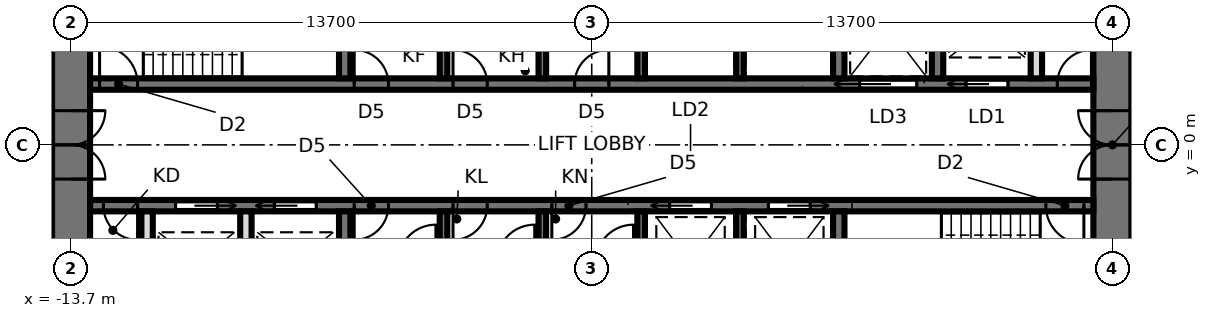
"""IFC4 building model, lengths in metres.
Left out: names, types, materials, properties, quantities, classifications, styles, units other than length and angle.
Written with IfcOpenShell. Run it as: python <this file> out.ifc"""

import sys

from ifc_helpers import new_model, si_unit, direction, frame, frame_2d, origin, place, context, subcontext, project, spatial, rectangle, extrude, element, fill, save


model = new_model("IFC4")
c1 = context("Model", 3, precision=1e-05, world=origin(), true_north=direction((0.0, 1.0)))
c2 = subcontext(c1, "Body", "Model", "MODEL_VIEW")
j1 = project(units=[si_unit("LENGTHUNIT", "METRE"), si_unit("PLANEANGLEUNIT", "RADIAN")], contexts=[c1])
p1 = place(None, origin())
s1 = spatial("IfcSite", under=j1, at=p1, CompositionType="ELEMENT")
p2 = place(p1, origin())
s2 = spatial("IfcBuilding", under=s1, at=p2, CompositionType="ELEMENT")
p3 = place(p2, frame((0.0, 0.0, 211.1)))
s3 = spatial("IfcBuildingStorey", under=s2, at=p3, CompositionType="ELEMENT", Elevation=211.1)
p4 = place(p3, frame((13.7, -9.5, 0.0), z_axis=(0.0, 0.0, 1.0), x_axis=(0.0, 1.0, 0.0)))
e1 = element("IfcWall", 1, at=p4, inside=s3, PredefinedType="SHEAR", context=c2, shape_type="SweptSolid", body=[
    extrude(rectangle(XDim=19.0, YDim=1.0, at=frame_2d((9.5, 0.0))), origin(), (0.0, 0.0, 1.0), 3.9),
])
p5 = place(p4, frame((8.6, 0.0, 0.0)))
e2 = element("IfcOpeningElement", 2, at=p5, cuts=e1, PredefinedType="OPENING", context=c2, shape_type="SweptSolid", body=[
    extrude(rectangle(XDim=1.8, YDim=2.4, at=frame_2d((0.9, 1.2))), frame((0.0, 0.51, 0.0), z_axis=(0.0, -1.0, 0.0), x_axis=(1.0, 0.0, 0.0)), (0.0, 0.0, 1.0), 1.02),
])
p6 = place(p3, frame((-13.7, 9.5, 0.0), z_axis=(0.0, 0.0, 1.0), x_axis=(0.0, -1.0, 0.0)))
e3 = element("IfcWall", 3, at=p6, inside=s3, PredefinedType="SHEAR", context=c2, shape_type="SweptSolid", body=[
    extrude(rectangle(XDim=19.0, YDim=1.0, at=frame_2d((9.5, 0.0))), origin(), (0.0, 0.0, 1.0), 3.9),
])
p7 = place(p6, frame((8.6, 0.0, 0.0)))
e4 = element("IfcOpeningElement", 4, at=p7, cuts=e3, PredefinedType="OPENING", context=c2, shape_type="SweptSolid", body=[
    extrude(rectangle(XDim=1.8, YDim=2.4, at=frame_2d((0.9, 1.2))), frame((0.0, 0.51, 0.0), z_axis=(0.0, -1.0, 0.0), x_axis=(1.0, 0.0, 0.0)), (0.0, 0.0, 1.0), 1.02),
])
p8 = place(p3, frame((-13.2, 1.6, 0.0), z_axis=(0.0, 0.0, 1.0), x_axis=(1.0, 0.0, 0.0)))
e5 = element("IfcWall", 5, at=p8, inside=s3, PredefinedType="SHEAR", context=c2, shape_type="SweptSolid", body=[
    extrude(rectangle(XDim=26.4, YDim=0.3, at=frame_2d((13.2, 0.0))), origin(), (0.0, 0.0, 1.0), 3.9),
])
p9 = place(p8, frame((0.25, 0.0, 0.0)))
e6 = element("IfcOpeningElement", 6, at=p9, cuts=e5, PredefinedType="OPENING", context=c2, shape_type="SweptSolid", body=[
    extrude(rectangle(XDim=1.0, YDim=2.1, at=frame_2d((0.5, 1.05))), frame((0.0, 0.16, 0.0), z_axis=(0.0, -1.0, 0.0), x_axis=(1.0, 0.0, 0.0)), (0.0, 0.0, 1.0), 0.32),
])
p10 = place(p8, frame((23.05, 0.0, 0.0)))
e7 = element("IfcOpeningElement", 7, at=p10, cuts=e5, PredefinedType="OPENING", context=c2, shape_type="SweptSolid", body=[
    extrude(rectangle(XDim=1.1, YDim=2.3, at=frame_2d((0.55, 1.15))), frame((0.0, 0.16, 0.0), z_axis=(0.0, -1.0, 0.0), x_axis=(1.0, 0.0, 0.0)), (0.0, 0.0, 1.0), 0.32),
])
p11 = place(p8, frame((20.25, 0.0, 0.0)))
e8 = element("IfcOpeningElement", 8, at=p11, cuts=e5, PredefinedType="OPENING", context=c2, shape_type="SweptSolid", body=[
    extrude(rectangle(XDim=1.5, YDim=2.4, at=frame_2d((0.75, 1.2))), frame((0.0, 0.16, 0.0), z_axis=(0.0, -1.0, 0.0), x_axis=(1.0, 0.0, 0.0)), (0.0, 0.0, 1.0), 0.32),
])
p12 = place(p8, frame((6.95, 0.0, 0.0)))
e9 = element("IfcOpeningElement", 9, at=p12, cuts=e5, PredefinedType="OPENING", context=c2, shape_type="SweptSolid", body=[
    extrude(rectangle(XDim=0.9, YDim=2.1, at=frame_2d((0.45, 1.05))), frame((0.0, 0.16, 0.0), z_axis=(0.0, -1.0, 0.0), x_axis=(1.0, 0.0, 0.0)), (0.0, 0.0, 1.0), 0.32),
])
p13 = place(p8, frame((9.55, 0.0, 0.0)))
e10 = element("IfcOpeningElement", 10, at=p13, cuts=e5, PredefinedType="OPENING", context=c2, shape_type="SweptSolid", body=[
    extrude(rectangle(XDim=0.9, YDim=2.1, at=frame_2d((0.45, 1.05))), frame((0.0, 0.16, 0.0), z_axis=(0.0, -1.0, 0.0), x_axis=(1.0, 0.0, 0.0)), (0.0, 0.0, 1.0), 0.32),
])
p14 = place(p8, frame((12.75, 0.0, 0.0)))
e11 = element("IfcOpeningElement", 11, at=p14, cuts=e5, PredefinedType="OPENING", context=c2, shape_type="SweptSolid", body=[
    extrude(rectangle(XDim=0.9, YDim=2.1, at=frame_2d((0.45, 1.05))), frame((0.0, 0.16, 0.0), z_axis=(0.0, -1.0, 0.0), x_axis=(1.0, 0.0, 0.0)), (0.0, 0.0, 1.0), 0.32),
])
p15 = place(p8, frame((25.45, 0.0, 0.0)))
e12 = element("IfcOpeningElement", 12, at=p15, cuts=e5, PredefinedType="OPENING", context=c2, shape_type="SweptSolid", body=[
    extrude(rectangle(XDim=0.9, YDim=2.1, at=frame_2d((0.45, 1.05))), frame((0.0, 0.16, 0.0), z_axis=(0.0, -1.0, 0.0), x_axis=(1.0, 0.0, 0.0)), (0.0, 0.0, 1.0), 0.32),
])
p16 = place(p3, frame((-13.2, -1.6, 0.0), z_axis=(0.0, 0.0, 1.0), x_axis=(1.0, 0.0, 0.0)))
e13 = element("IfcWall", 13, at=p16, inside=s3, PredefinedType="SHEAR", context=c2, shape_type="SweptSolid", body=[
    extrude(rectangle(XDim=26.4, YDim=0.3, at=frame_2d((13.2, 0.0))), origin(), (0.0, 0.0, 1.0), 3.9),
])
p17 = place(p16, frame((25.15, 0.0, 0.0)))
e14 = element("IfcOpeningElement", 14, at=p17, cuts=e13, PredefinedType="OPENING", context=c2, shape_type="SweptSolid", body=[
    extrude(rectangle(XDim=1.0, YDim=2.1, at=frame_2d((0.5, 1.05))), frame((0.0, 0.16, 0.0), z_axis=(0.0, -1.0, 0.0), x_axis=(1.0, 0.0, 0.0)), (0.0, 0.0, 1.0), 0.32),
])
p18 = place(p16, frame((6.95, 0.0, 0.0)))
e15 = element("IfcOpeningElement", 15, at=p18, cuts=e13, PredefinedType="OPENING", context=c2, shape_type="SweptSolid", body=[
    extrude(rectangle(XDim=0.9, YDim=2.1, at=frame_2d((0.45, 1.05))), frame((0.0, 0.16, 0.0), z_axis=(0.0, -1.0, 0.0), x_axis=(1.0, 0.0, 0.0)), (0.0, 0.0, 1.0), 0.32),
])
p19 = place(p16, frame((9.55, 0.0, 0.0)))
e16 = element("IfcOpeningElement", 16, at=p19, cuts=e13, PredefinedType="OPENING", context=c2, shape_type="SweptSolid", body=[
    extrude(rectangle(XDim=0.9, YDim=2.1, at=frame_2d((0.45, 1.05))), frame((0.0, 0.16, 0.0), z_axis=(0.0, -1.0, 0.0), x_axis=(1.0, 0.0, 0.0)), (0.0, 0.0, 1.0), 0.32),
])
p20 = place(p16, frame((12.15, 0.0, 0.0)))
e17 = element("IfcOpeningElement", 17, at=p20, cuts=e13, PredefinedType="OPENING", context=c2, shape_type="SweptSolid", body=[
    extrude(rectangle(XDim=0.9, YDim=2.1, at=frame_2d((0.45, 1.05))), frame((0.0, 0.16, 0.0), z_axis=(0.0, -1.0, 0.0), x_axis=(1.0, 0.0, 0.0)), (0.0, 0.0, 1.0), 0.32),
])
p21 = place(p16, frame((15.25, 0.0, 0.0)))
e18 = element("IfcOpeningElement", 18, at=p21, cuts=e13, PredefinedType="OPENING", context=c2, shape_type="SweptSolid", body=[
    extrude(rectangle(XDim=1.1, YDim=2.3, at=frame_2d((0.55, 1.15))), frame((0.0, 0.16, 0.0), z_axis=(0.0, -1.0, 0.0), x_axis=(1.0, 0.0, 0.0)), (0.0, 0.0, 1.0), 0.32),
])
p22 = place(p16, frame((17.85, 0.0, 0.0)))
e19 = element("IfcOpeningElement", 19, at=p22, cuts=e13, PredefinedType="OPENING", context=c2, shape_type="SweptSolid", body=[
    extrude(rectangle(XDim=1.1, YDim=2.3, at=frame_2d((0.55, 1.15))), frame((0.0, 0.16, 0.0), z_axis=(0.0, -1.0, 0.0), x_axis=(1.0, 0.0, 0.0)), (0.0, 0.0, 1.0), 0.32),
])
p23 = place(p16, frame((4.85, 0.0, 0.0)))
e20 = element("IfcOpeningElement", 20, at=p23, cuts=e13, PredefinedType="OPENING", context=c2, shape_type="SweptSolid", body=[
    extrude(rectangle(XDim=1.1, YDim=2.3, at=frame_2d((0.55, 1.15))), frame((0.0, 0.16, 0.0), z_axis=(0.0, -1.0, 0.0), x_axis=(1.0, 0.0, 0.0)), (0.0, 0.0, 1.0), 0.32),
])
p24 = place(p16, frame((2.25, 0.0, 0.0)))
e21 = element("IfcOpeningElement", 21, at=p24, cuts=e13, PredefinedType="OPENING", context=c2, shape_type="SweptSolid", body=[
    extrude(rectangle(XDim=1.1, YDim=2.3, at=frame_2d((0.55, 1.15))), frame((0.0, 0.16, 0.0), z_axis=(0.0, -1.0, 0.0), x_axis=(1.0, 0.0, 0.0)), (0.0, 0.0, 1.0), 0.32),
])
p25 = place(p16, frame((0.35, 0.0, 0.0)))
e22 = element("IfcOpeningElement", 22, at=p25, cuts=e13, PredefinedType="OPENING", context=c2, shape_type="SweptSolid", body=[
    extrude(rectangle(XDim=0.9, YDim=2.1, at=frame_2d((0.45, 1.05))), frame((0.0, 0.16, 0.0), z_axis=(0.0, -1.0, 0.0), x_axis=(1.0, 0.0, 0.0)), (0.0, 0.0, 1.0), 0.32),
])
for number, where, z_axis, x_axis in (
    (23, (-6.5, 1.75, 0.0), (0.0, 0.0, 1.0), (0.0, 1.0, 0.0)),
    (24, (6.5, 1.75, 0.0), (0.0, 0.0, 1.0), (0.0, 1.0, 0.0)),
):
    element("IfcWall", number, at=place(p3, frame(where, z_axis=z_axis, x_axis=x_axis)), inside=s3, PredefinedType="SHEAR", context=c2, shape_type="SweptSolid", body=[
        extrude(rectangle(XDim=2.7, YDim=0.3, at=frame_2d((1.35, 0.0))), origin(), (0.0, 0.0, 1.0), 3.9),
    ])
for number, where, z_axis, x_axis in (
    (25, (-3.9, 1.75, 0.0), (0.0, 0.0, 1.0), (0.0, 1.0, 0.0)),
    (26, (-1.3, 1.75, 0.0), (0.0, 0.0, 1.0), (0.0, 1.0, 0.0)),
    (27, (1.3, 1.75, 0.0), (0.0, 0.0, 1.0), (0.0, 1.0, 0.0)),
    (28, (3.9, 1.75, 0.0), (0.0, 0.0, 1.0), (0.0, 1.0, 0.0)),
):
    element("IfcWall", number, at=place(p3, frame(where, z_axis=z_axis, x_axis=x_axis)), inside=s3, PredefinedType="SHEAR", context=c2, shape_type="SweptSolid", body=[
        extrude(rectangle(XDim=2.7, YDim=0.2, at=frame_2d((1.35, 0.0))), origin(), (0.0, 0.0, 1.0), 3.9),
    ])
for number, where, z_axis, x_axis in (
    (29, (-6.5, -1.75, 0.0), (0.0, 0.0, 1.0), (0.0, -1.0, 0.0)),
    (30, (6.5, -1.75, 0.0), (0.0, 0.0, 1.0), (0.0, -1.0, 0.0)),
):
    element("IfcWall", number, at=place(p3, frame(where, z_axis=z_axis, x_axis=x_axis)), inside=s3, PredefinedType="SHEAR", context=c2, shape_type="SweptSolid", body=[
        extrude(rectangle(XDim=2.7, YDim=0.3, at=frame_2d((1.35, 0.0))), origin(), (0.0, 0.0, 1.0), 3.9),
    ])
for number, where, z_axis, x_axis in (
    (31, (-3.9, -1.75, 0.0), (0.0, 0.0, 1.0), (0.0, -1.0, 0.0)),
    (32, (-1.3, -1.75, 0.0), (0.0, 0.0, 1.0), (0.0, -1.0, 0.0)),
    (33, (1.3, -1.75, 0.0), (0.0, 0.0, 1.0), (0.0, -1.0, 0.0)),
    (34, (3.9, -1.75, 0.0), (0.0, 0.0, 1.0), (0.0, -1.0, 0.0)),
):
    element("IfcWall", number, at=place(p3, frame(where, z_axis=z_axis, x_axis=x_axis)), inside=s3, PredefinedType="SHEAR", context=c2, shape_type="SweptSolid", body=[
        extrude(rectangle(XDim=2.7, YDim=0.2, at=frame_2d((1.35, 0.0))), origin(), (0.0, 0.0, 1.0), 3.9),
    ])
p26 = place(p3, frame((9.1, 1.75, 0.0), z_axis=(0.0, 0.0, 1.0), x_axis=(0.0, 1.0, 0.0)))
e35 = element("IfcWall", 35, at=p26, inside=s3, PredefinedType="SHEAR", context=c2, shape_type="SweptSolid", body=[
    extrude(rectangle(XDim=2.7, YDim=0.3, at=frame_2d((1.35, 0.0))), origin(), (0.0, 0.0, 1.0), 3.9),
])
for number, where, z_axis, x_axis in (
    (36, (-9.1, -1.75, 0.0), (0.0, 0.0, 1.0), (0.0, -1.0, 0.0)),
    (37, (-11.7, -1.75, 0.0), (0.0, 0.0, 1.0), (0.0, -1.0, 0.0)),
    (38, (11.7, 1.75, 0.0), (0.0, 0.0, 1.0), (0.0, 1.0, 0.0)),
):
    element("IfcWall", number, at=place(p3, frame(where, z_axis=z_axis, x_axis=x_axis)), inside=s3, PredefinedType="SOLIDWALL", context=c2, shape_type="SweptSolid", body=[
        extrude(rectangle(XDim=2.7, YDim=0.3, at=frame_2d((1.35, 0.0))), origin(), (0.0, 0.0, 1.0), 3.74),
    ])
p27 = place(p7, origin())
e39 = element("IfcDoor", 39, at=p27, inside=s3, OperationType="DOUBLE_DOOR_SINGLE_SWING", PredefinedType="DOOR", context=c2, shape_type="SweptSolid", body=[
    extrude(rectangle(XDim=1.72, YDim=2.36, at=frame_2d((0.9, 1.18))), frame((0.0, 0.025, 0.0), z_axis=(0.0, -1.0, 0.0), x_axis=(1.0, 0.0, 0.0)), (0.0, 0.0, 1.0), 0.05),
    extrude(rectangle(XDim=0.04, YDim=2.4, at=frame_2d((0.02, 1.2))), frame((0.0, 0.25, 0.0), z_axis=(0.0, -1.0, 0.0), x_axis=(1.0, 0.0, 0.0)), (0.0, 0.0, 1.0), 0.5),
    extrude(rectangle(XDim=0.04, YDim=2.4, at=frame_2d((1.78, 1.2))), frame((0.0, 0.25, 0.0), z_axis=(0.0, -1.0, 0.0), x_axis=(1.0, 0.0, 0.0)), (0.0, 0.0, 1.0), 0.5),
    extrude(rectangle(XDim=1.72, YDim=0.04, at=frame_2d((0.9, 2.38))), frame((0.0, 0.25, 0.0), z_axis=(0.0, -1.0, 0.0), x_axis=(1.0, 0.0, 0.0)), (0.0, 0.0, 1.0), 0.5),
])
fill(e4, e39)
p28 = place(p5, origin())
e40 = element("IfcDoor", 40, at=p28, inside=s3, OperationType="DOUBLE_DOOR_SINGLE_SWING", PredefinedType="DOOR", context=c2, shape_type="SweptSolid", body=[
    extrude(rectangle(XDim=1.72, YDim=2.36, at=frame_2d((0.9, 1.18))), frame((0.0, 0.025, 0.0), z_axis=(0.0, -1.0, 0.0), x_axis=(1.0, 0.0, 0.0)), (0.0, 0.0, 1.0), 0.05),
    extrude(rectangle(XDim=0.04, YDim=2.4, at=frame_2d((0.02, 1.2))), frame((0.0, 0.25, 0.0), z_axis=(0.0, -1.0, 0.0), x_axis=(1.0, 0.0, 0.0)), (0.0, 0.0, 1.0), 0.5),
    extrude(rectangle(XDim=0.04, YDim=2.4, at=frame_2d((1.78, 1.2))), frame((0.0, 0.25, 0.0), z_axis=(0.0, -1.0, 0.0), x_axis=(1.0, 0.0, 0.0)), (0.0, 0.0, 1.0), 0.5),
    extrude(rectangle(XDim=1.72, YDim=0.04, at=frame_2d((0.9, 2.38))), frame((0.0, 0.25, 0.0), z_axis=(0.0, -1.0, 0.0), x_axis=(1.0, 0.0, 0.0)), (0.0, 0.0, 1.0), 0.5),
])
fill(e2, e40)
p29 = place(p9, origin())
e41 = element("IfcDoor", 41, at=p29, inside=s3, OperationType="SINGLE_SWING_LEFT", PredefinedType="DOOR", context=c2, shape_type="SweptSolid", body=[
    extrude(rectangle(XDim=1.0, YDim=2.1, at=frame_2d((0.5, 1.05))), frame((0.0, 0.025, 0.0), z_axis=(0.0, -1.0, 0.0), x_axis=(1.0, 0.0, 0.0)), (0.0, 0.0, 1.0), 0.05),
])
fill(e6, e41)
p30 = place(p17, frame((1.0, 0.0, 0.0), z_axis=(0.0, 0.0, 1.0), x_axis=(-1.0, 0.0, 0.0)))
e42 = element("IfcDoor", 42, at=p30, inside=s3, OperationType="SINGLE_SWING_LEFT", PredefinedType="DOOR", context=c2, shape_type="SweptSolid", body=[
    extrude(rectangle(XDim=1.0, YDim=2.1, at=frame_2d((0.5, 1.05))), frame((0.0, 0.025, 0.0), z_axis=(0.0, -1.0, 0.0), x_axis=(1.0, 0.0, 0.0)), (0.0, 0.0, 1.0), 0.05),
])
fill(e14, e42)
p31 = place(p10, origin())
e43 = element("IfcDoor", 43, at=p31, inside=s3, OperationType="SLIDING_TO_LEFT", PredefinedType="DOOR", context=c2, shape_type="SweptSolid", body=[
    extrude(rectangle(XDim=1.1, YDim=2.3, at=frame_2d((0.55, 1.15))), frame((0.0, 0.025, 0.0), z_axis=(0.0, -1.0, 0.0), x_axis=(1.0, 0.0, 0.0)), (0.0, 0.0, 1.0), 0.05),
])
fill(e7, e43)
p32 = place(p11, origin())
e44 = element("IfcDoor", 44, at=p32, inside=s3, OperationType="SLIDING_TO_LEFT", PredefinedType="DOOR", context=c2, shape_type="SweptSolid", body=[
    extrude(rectangle(XDim=1.5, YDim=2.4, at=frame_2d((0.75, 1.2))), frame((0.0, 0.025, 0.0), z_axis=(0.0, -1.0, 0.0), x_axis=(1.0, 0.0, 0.0)), (0.0, 0.0, 1.0), 0.05),
])
fill(e8, e44)
p33 = place(p12, origin())
e45 = element("IfcDoor", 45, at=p33, inside=s3, OperationType="SINGLE_SWING_LEFT", PredefinedType="DOOR", context=c2, shape_type="SweptSolid", body=[
    extrude(rectangle(XDim=0.9, YDim=2.1, at=frame_2d((0.45, 1.05))), frame((0.0, 0.025, 0.0), z_axis=(0.0, -1.0, 0.0), x_axis=(1.0, 0.0, 0.0)), (0.0, 0.0, 1.0), 0.05),
])
fill(e9, e45)
p34 = place(p13, origin())
e46 = element("IfcDoor", 46, at=p34, inside=s3, OperationType="SINGLE_SWING_LEFT", PredefinedType="DOOR", context=c2, shape_type="SweptSolid", body=[
    extrude(rectangle(XDim=0.9, YDim=2.1, at=frame_2d((0.45, 1.05))), frame((0.0, 0.025, 0.0), z_axis=(0.0, -1.0, 0.0), x_axis=(1.0, 0.0, 0.0)), (0.0, 0.0, 1.0), 0.05),
])
fill(e10, e46)
p35 = place(p14, origin())
e47 = element("IfcDoor", 47, at=p35, inside=s3, OperationType="SINGLE_SWING_RIGHT", PredefinedType="DOOR", context=c2, shape_type="SweptSolid", body=[
    extrude(rectangle(XDim=0.9, YDim=2.1, at=frame_2d((0.45, 1.05))), frame((0.0, 0.025, 0.0), z_axis=(0.0, -1.0, 0.0), x_axis=(1.0, 0.0, 0.0)), (0.0, 0.0, 1.0), 0.05),
])
fill(e11, e47)
p36 = place(p18, frame((0.9, 0.0, 0.0), z_axis=(0.0, 0.0, 1.0), x_axis=(-1.0, 0.0, 0.0)))
e48 = element("IfcDoor", 48, at=p36, inside=s3, OperationType="SINGLE_SWING_RIGHT", PredefinedType="DOOR", context=c2, shape_type="SweptSolid", body=[
    extrude(rectangle(XDim=0.9, YDim=2.1, at=frame_2d((0.45, 1.05))), frame((0.0, 0.025, 0.0), z_axis=(0.0, -1.0, 0.0), x_axis=(1.0, 0.0, 0.0)), (0.0, 0.0, 1.0), 0.05),
])
fill(e15, e48)
p37 = place(p19, frame((0.9, 0.0, 0.0), z_axis=(0.0, 0.0, 1.0), x_axis=(-1.0, 0.0, 0.0)))
e49 = element("IfcDoor", 49, at=p37, inside=s3, OperationType="SINGLE_SWING_RIGHT", PredefinedType="DOOR", context=c2, shape_type="SweptSolid", body=[
    extrude(rectangle(XDim=0.9, YDim=2.1, at=frame_2d((0.45, 1.05))), frame((0.0, 0.025, 0.0), z_axis=(0.0, -1.0, 0.0), x_axis=(1.0, 0.0, 0.0)), (0.0, 0.0, 1.0), 0.05),
])
fill(e16, e49)
p38 = place(p20, frame((0.9, 0.0, 0.0), z_axis=(0.0, 0.0, 1.0), x_axis=(-1.0, 0.0, 0.0)))
e50 = element("IfcDoor", 50, at=p38, inside=s3, OperationType="SINGLE_SWING_RIGHT", PredefinedType="DOOR", context=c2, shape_type="SweptSolid", body=[
    extrude(rectangle(XDim=0.9, YDim=2.1, at=frame_2d((0.45, 1.05))), frame((0.0, 0.025, 0.0), z_axis=(0.0, -1.0, 0.0), x_axis=(1.0, 0.0, 0.0)), (0.0, 0.0, 1.0), 0.05),
])
fill(e17, e50)
p39 = place(p21, frame((1.1, 0.0, 0.0), z_axis=(0.0, 0.0, 1.0), x_axis=(-1.0, 0.0, 0.0)))
e51 = element("IfcDoor", 51, at=p39, inside=s3, OperationType="SLIDING_TO_RIGHT", PredefinedType="DOOR", context=c2, shape_type="SweptSolid", body=[
    extrude(rectangle(XDim=1.1, YDim=2.3, at=frame_2d((0.55, 1.15))), frame((0.0, 0.025, 0.0), z_axis=(0.0, -1.0, 0.0), x_axis=(1.0, 0.0, 0.0)), (0.0, 0.0, 1.0), 0.05),
])
fill(e18, e51)
p40 = place(p22, frame((1.1, 0.0, 0.0), z_axis=(0.0, 0.0, 1.0), x_axis=(-1.0, 0.0, 0.0)))
e52 = element("IfcDoor", 52, at=p40, inside=s3, OperationType="SLIDING_TO_LEFT", PredefinedType="DOOR", context=c2, shape_type="SweptSolid", body=[
    extrude(rectangle(XDim=1.1, YDim=2.3, at=frame_2d((0.55, 1.15))), frame((0.0, 0.025, 0.0), z_axis=(0.0, -1.0, 0.0), x_axis=(1.0, 0.0, 0.0)), (0.0, 0.0, 1.0), 0.05),
])
fill(e19, e52)
p41 = place(p23, frame((1.1, 0.0, 0.0), z_axis=(0.0, 0.0, 1.0), x_axis=(-1.0, 0.0, 0.0)))
e53 = element("IfcDoor", 53, at=p41, inside=s3, OperationType="SLIDING_TO_RIGHT", PredefinedType="DOOR", context=c2, shape_type="SweptSolid", body=[
    extrude(rectangle(XDim=1.1, YDim=2.3, at=frame_2d((0.55, 1.15))), frame((0.0, 0.025, 0.0), z_axis=(0.0, -1.0, 0.0), x_axis=(1.0, 0.0, 0.0)), (0.0, 0.0, 1.0), 0.05),
])
fill(e20, e53)
p42 = place(p24, frame((1.1, 0.0, 0.0), z_axis=(0.0, 0.0, 1.0), x_axis=(-1.0, 0.0, 0.0)))
e54 = element("IfcDoor", 54, at=p42, inside=s3, OperationType="SLIDING_TO_LEFT", PredefinedType="DOOR", context=c2, shape_type="SweptSolid", body=[
    extrude(rectangle(XDim=1.1, YDim=2.3, at=frame_2d((0.55, 1.15))), frame((0.0, 0.025, 0.0), z_axis=(0.0, -1.0, 0.0), x_axis=(1.0, 0.0, 0.0)), (0.0, 0.0, 1.0), 0.05),
])
fill(e21, e54)
p43 = place(p15, origin())
e55 = element("IfcDoor", 55, at=p43, inside=s3, OperationType="SINGLE_SWING_RIGHT", PredefinedType="DOOR", context=c2, shape_type="SweptSolid", body=[
    extrude(rectangle(XDim=0.9, YDim=2.1, at=frame_2d((0.45, 1.05))), frame((0.0, 0.025, 0.0), z_axis=(0.0, -1.0, 0.0), x_axis=(1.0, 0.0, 0.0)), (0.0, 0.0, 1.0), 0.05),
])
fill(e12, e55)
p44 = place(p25, frame((0.9, 0.0, 0.0), z_axis=(0.0, 0.0, 1.0), x_axis=(-1.0, 0.0, 0.0)))
e56 = element("IfcDoor", 56, at=p44, inside=s3, OperationType="SINGLE_SWING_LEFT", PredefinedType="DOOR", context=c2, shape_type="SweptSolid", body=[
    extrude(rectangle(XDim=0.9, YDim=2.1, at=frame_2d((0.45, 1.05))), frame((0.0, 0.025, 0.0), z_axis=(0.0, -1.0, 0.0), x_axis=(1.0, 0.0, 0.0)), (0.0, 0.0, 1.0), 0.05),
])
fill(e22, e56)
save(model, sys.argv[1])
